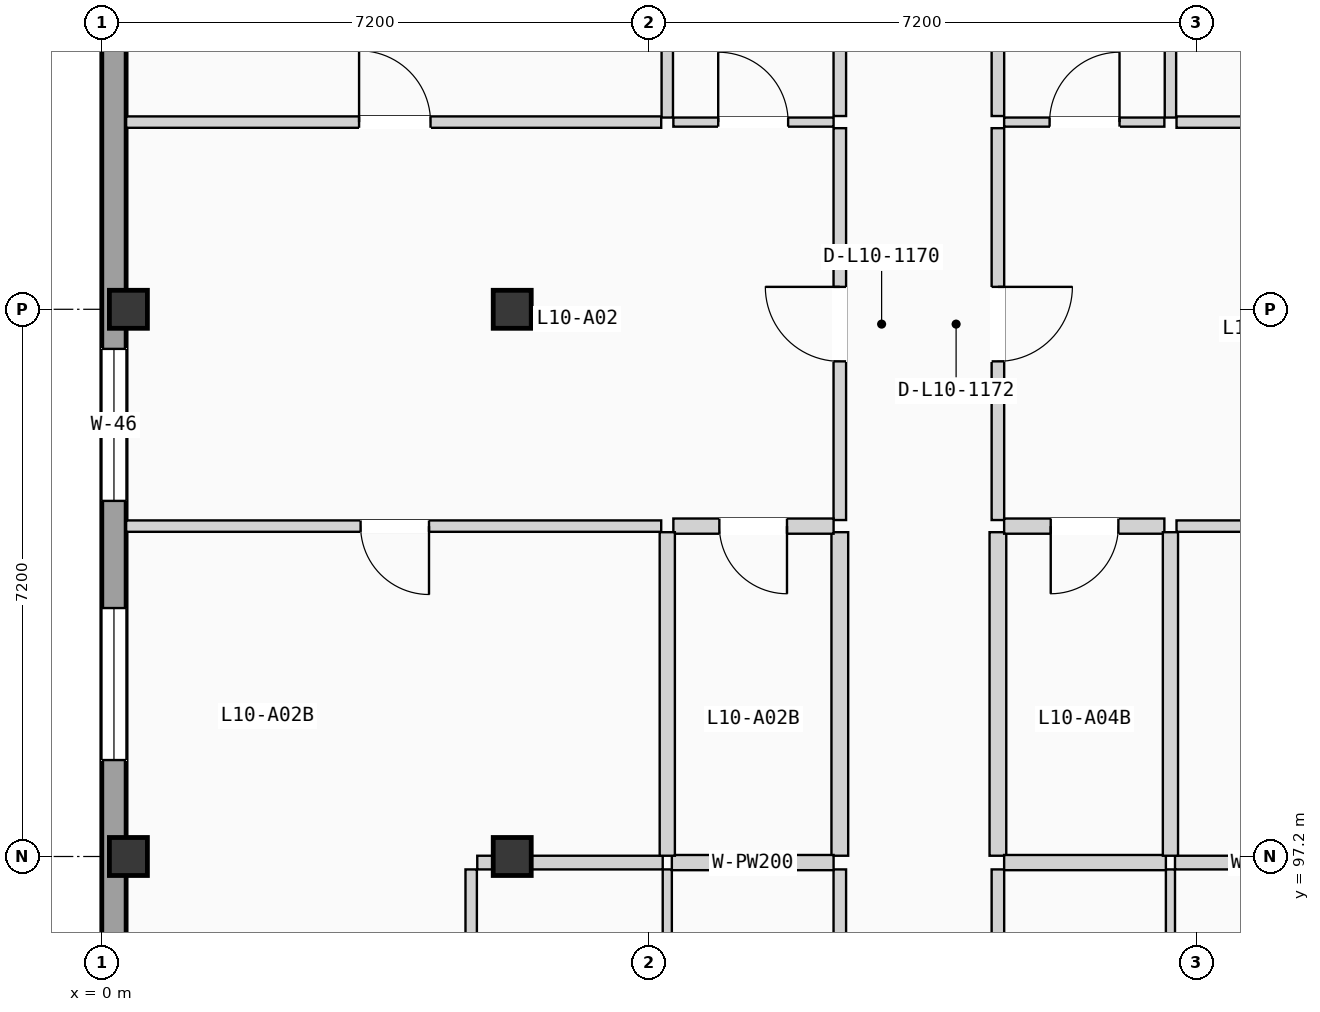
"""IFC4 building model, lengths in metres.
Left out: names, types, materials, properties, quantities, classifications, styles, units other than length and angle.
Written with IfcOpenShell. Run it as: python <this file> out.ifc"""

import sys

from ifc_helpers import new_model, si_unit, direction, frame, frame_2d, origin, origin_2d, place, context, subcontext, project, spatial, rectangle, extrude, element, fill, save


model = new_model("IFC4")
c1 = context("Model", 3, precision=1e-05, world=origin(), true_north=direction((0.0, 1.0)))
c2 = subcontext(c1, "Body", "Model", "MODEL_VIEW")
j1 = project(units=[si_unit("LENGTHUNIT", "METRE"), si_unit("PLANEANGLEUNIT", "RADIAN")], contexts=[c1])
p1 = place(None, origin())
s1 = spatial("IfcSite", under=j1, at=p1, CompositionType="ELEMENT")
p2 = place(p1, origin())
s2 = spatial("IfcBuilding", under=s1, at=p2, CompositionType="ELEMENT")
p3 = place(p2, frame((0.0, 0.0, 34.125)))
s3 = spatial("IfcBuildingStorey", under=s2, at=p3, CompositionType="ELEMENT", Elevation=34.125)
for number, where, z_axis, x_axis in (
    (1, (0.35, 97.2, 0.0), (0.0, 0.0, 1.0), (1.0, 0.0, 0.0)),
    (2, (0.35, 104.4, 0.0), (0.0, 0.0, 1.0), (1.0, 0.0, 0.0)),
    (3, (5.4, 97.2, 0.0), (0.0, 0.0, 1.0), (1.0, 0.0, 0.0)),
    (4, (5.4, 104.4, 0.0), (0.0, 0.0, 1.0), (1.0, 0.0, 0.0)),
):
    element("IfcColumn", number, at=place(p3, frame(where, z_axis=z_axis, x_axis=x_axis)), inside=s3, PredefinedType="COLUMN", context=c2, shape_type="SweptSolid", body=[
        extrude(rectangle(XDim=0.5, YDim=0.5, at=origin_2d()), origin(), (0.0, 0.0, 1.0), 3.15),
    ])
p4 = place(p3, frame((0.16, 68.72, 0.0), z_axis=(0.0, 0.0, 1.0), x_axis=(0.0, 1.0, 0.0)))
e5 = element("IfcWall", 5, at=p4, inside=s3, PredefinedType="SOLIDWALL", context=c2, shape_type="SweptSolid", body=[
    extrude(rectangle(XDim=49.76, YDim=0.32, at=frame_2d((24.88, 0.0))), origin(), (0.0, 0.0, 1.0), 2.89),
])
p5 = place(p4, frame((16.755, 0.0, 0.705)))
e6 = element("IfcOpeningElement", 6, at=p5, cuts=e5, PredefinedType="OPENING", context=c2, shape_type="SweptSolid", body=[
    extrude(rectangle(XDim=1.85, YDim=1.5, at=frame_2d((0.925, 0.75))), frame((0.0, 0.17, 0.0), z_axis=(0.0, -1.0, 0.0), x_axis=(1.0, 0.0, 0.0)), (0.0, 0.0, 1.0), 0.34),
])
p6 = place(p4, frame((9.62, 0.0, 0.555)))
e7 = element("IfcOpeningElement", 7, at=p6, cuts=e5, PredefinedType="OPENING", context=c2, shape_type="SweptSolid", body=[
    extrude(rectangle(XDim=1.85, YDim=1.65, at=frame_2d((0.925, 0.825))), frame((0.0, 0.17, 0.0), z_axis=(0.0, -1.0, 0.0), x_axis=(1.0, 0.0, 0.0)), (0.0, 0.0, 1.0), 0.34),
])
p7 = place(p4, frame((24.405, 0.0, 0.85)))
e8 = element("IfcOpeningElement", 8, at=p7, cuts=e5, PredefinedType="OPENING", context=c2, shape_type="SweptSolid", body=[
    extrude(rectangle(XDim=0.95, YDim=1.2, at=frame_2d((0.475, 0.6))), frame((0.0, 0.17, 0.0), z_axis=(0.0, -1.0, 0.0), x_axis=(1.0, 0.0, 0.0)), (0.0, 0.0, 1.0), 0.34),
])
p8 = place(p4, frame((33.159, 0.0, 0.9)))
e9 = element("IfcOpeningElement", 9, at=p8, cuts=e5, PredefinedType="OPENING", context=c2, shape_type="SweptSolid", body=[
    extrude(rectangle(XDim=2.0, YDim=1.2, at=frame_2d((1.0, 0.6))), frame((0.0, 0.17, 0.0), z_axis=(0.0, -1.0, 0.0), x_axis=(1.0, 0.0, 0.0)), (0.0, 0.0, 1.0), 0.34),
])
p9 = place(p4, frame((29.749, 0.0, 0.855)))
e10 = element("IfcOpeningElement", 10, at=p9, cuts=e5, PredefinedType="OPENING", context=c2, shape_type="SweptSolid", body=[
    extrude(rectangle(XDim=2.0, YDim=1.35, at=frame_2d((1.0, 0.675))), frame((0.0, 0.17, 0.0), z_axis=(0.0, -1.0, 0.0), x_axis=(1.0, 0.0, 0.0)), (0.0, 0.0, 1.0), 0.34),
])
p10 = place(p4, frame((39.352, 0.0, 0.705)))
e11 = element("IfcOpeningElement", 11, at=p10, cuts=e5, PredefinedType="OPENING", context=c2, shape_type="SweptSolid", body=[
    extrude(rectangle(XDim=2.0, YDim=1.5, at=frame_2d((1.0, 0.75))), frame((0.0, 0.17, 0.0), z_axis=(0.0, -1.0, 0.0), x_axis=(1.0, 0.0, 0.0)), (0.0, 0.0, 1.0), 0.34),
])
p11 = place(p3, frame((9.71, 89.13, 0.0), z_axis=(0.0, 0.0, 1.0), x_axis=(0.0, 1.0, 0.0)))
e12 = element("IfcWall", 12, at=p11, inside=s3, PredefinedType="PARTITIONING", context=c2, shape_type="SweptSolid", body=[
    extrude(rectangle(XDim=7.9, YDim=0.165, at=frame_2d((3.95, 0.0))), origin(), (0.0, 0.0, 1.0), 2.87),
])
p12 = place(p3, frame((9.71, 101.627, 0.0), z_axis=(0.0, 0.0, 1.0), x_axis=(0.0, 1.0, 0.0)))
e13 = element("IfcWall", 13, at=p12, inside=s3, PredefinedType="PARTITIONING", context=c2, shape_type="SweptSolid", body=[
    extrude(rectangle(XDim=5.156, YDim=0.165, at=frame_2d((2.578, 0.0))), origin(), (0.0, 0.0, 1.0), 2.87),
])
p13 = place(p12, frame((2.088, 0.0, 0.0)))
e14 = element("IfcOpeningElement", 14, at=p13, cuts=e13, PredefinedType="OPENING", context=c2, shape_type="SweptSolid", body=[
    extrude(rectangle(XDim=0.98, YDim=2.08, at=frame_2d((0.49, 1.04))), frame((0.0, 0.093, 0.0), z_axis=(0.0, -1.0, 0.0), x_axis=(1.0, 0.0, 0.0)), (0.0, 0.0, 1.0), 0.185),
])
p14 = place(p3, frame((9.71, 97.21, 0.0), z_axis=(0.0, 0.0, 1.0), x_axis=(0.0, 1.0, 0.0)))
e15 = element("IfcWall", 15, at=p14, inside=s3, PredefinedType="PLUMBINGWALL", context=c2, shape_type="SweptSolid", body=[
    extrude(rectangle(XDim=4.257, YDim=0.22, at=frame_2d((2.128, 0.0))), origin(), (0.0, 0.0, 1.0), 2.87),
])
p15 = place(p3, frame((9.71, 106.943, 0.0), z_axis=(0.0, 0.0, 1.0), x_axis=(0.0, 1.0, 0.0)))
e16 = element("IfcWall", 16, at=p15, inside=s3, PredefinedType="PARTITIONING", context=c2, shape_type="SweptSolid", body=[
    extrude(rectangle(XDim=4.257, YDim=0.165, at=frame_2d((2.128, 0.0))), origin(), (0.0, 0.0, 1.0), 2.87),
])
p16 = place(p3, frame((11.79, 89.13, 0.0), z_axis=(0.0, 0.0, 1.0), x_axis=(0.0, 1.0, 0.0)))
e17 = element("IfcWall", 17, at=p16, inside=s3, PredefinedType="PARTITIONING", context=c2, shape_type="SweptSolid", body=[
    extrude(rectangle(XDim=7.9, YDim=0.165, at=frame_2d((3.95, 0.0))), origin(), (0.0, 0.0, 1.0), 2.87),
])
p17 = place(p3, frame((11.79, 101.627, 0.0), z_axis=(0.0, 0.0, 1.0), x_axis=(0.0, 1.0, 0.0)))
e18 = element("IfcWall", 18, at=p17, inside=s3, PredefinedType="PARTITIONING", context=c2, shape_type="SweptSolid", body=[
    extrude(rectangle(XDim=5.156, YDim=0.165, at=frame_2d((2.578, 0.0))), origin(), (0.0, 0.0, 1.0), 2.87),
])
p18 = place(p17, frame((2.088, 0.0, 0.0)))
e19 = element("IfcOpeningElement", 19, at=p18, cuts=e18, PredefinedType="OPENING", context=c2, shape_type="SweptSolid", body=[
    extrude(rectangle(XDim=0.98, YDim=2.08, at=frame_2d((0.49, 1.04))), frame((0.0, 0.093, 0.0), z_axis=(0.0, -1.0, 0.0), x_axis=(1.0, 0.0, 0.0)), (0.0, 0.0, 1.0), 0.185),
])
p19 = place(p3, frame((11.79, 97.21, 0.0), z_axis=(0.0, 0.0, 1.0), x_axis=(0.0, 1.0, 0.0)))
e20 = element("IfcWall", 20, at=p19, inside=s3, PredefinedType="PLUMBINGWALL", context=c2, shape_type="SweptSolid", body=[
    extrude(rectangle(XDim=4.257, YDim=0.22, at=frame_2d((2.128, 0.0))), origin(), (0.0, 0.0, 1.0), 2.87),
])
p20 = place(p3, frame((11.79, 106.943, 0.0), z_axis=(0.0, 0.0, 1.0), x_axis=(0.0, 1.0, 0.0)))
e21 = element("IfcWall", 21, at=p20, inside=s3, PredefinedType="PARTITIONING", context=c2, shape_type="SweptSolid", body=[
    extrude(rectangle(XDim=4.257, YDim=0.165, at=frame_2d((2.128, 0.0))), origin(), (0.0, 0.0, 1.0), 2.87),
])
p21 = place(p3, frame((7.44, 89.11, 0.0), z_axis=(0.0, 0.0, 1.0), x_axis=(0.0, 1.0, 0.0)))
e22 = element("IfcWall", 22, at=p21, inside=s3, PredefinedType="PARTITIONING", context=c2, shape_type="SweptSolid", body=[
    extrude(rectangle(XDim=7.92, YDim=0.12, at=frame_2d((3.96, 0.0))), origin(), (0.0, 0.0, 1.0), 2.87),
])
p22 = place(p3, frame((7.5, 97.12, 0.0), z_axis=(0.0, 0.0, 1.0), x_axis=(1.0, 0.0, 0.0)))
e23 = element("IfcWall", 23, at=p22, inside=s3, PredefinedType="PLUMBINGWALL", context=c2, shape_type="SweptSolid", body=[
    extrude(rectangle(XDim=2.128, YDim=0.2, at=frame_2d((1.064, 0.0))), origin(), (0.0, 0.0, 1.0), 2.16),
])
p23 = place(p3, frame((4.86, 89.11, 0.0), z_axis=(0.0, 0.0, 1.0), x_axis=(0.0, 1.0, 0.0)))
e24 = element("IfcWall", 24, at=p23, inside=s3, PredefinedType="PARTITIONING", context=c2, shape_type="SweptSolid", body=[
    extrude(rectangle(XDim=7.92, YDim=0.15, at=frame_2d((3.96, 0.0))), origin(), (0.0, 0.0, 1.0), 2.87),
])
p24 = place(p3, frame((4.94, 97.12, 0.0), z_axis=(0.0, 0.0, 1.0), x_axis=(1.0, 0.0, 0.0)))
e25 = element("IfcWall", 25, at=p24, inside=s3, PredefinedType="PARTITIONING", context=c2, shape_type="SweptSolid", body=[
    extrude(rectangle(XDim=2.44, YDim=0.18, at=frame_2d((1.22, 0.0))), origin(), (0.0, 0.0, 1.0), 2.16),
])
p25 = place(p3, frame((7.52, 101.547, 0.0), z_axis=(0.0, 0.0, 1.0), x_axis=(1.0, 0.0, 0.0)))
e26 = element("IfcWall", 26, at=p25, inside=s3, PredefinedType="PLUMBINGWALL", context=c2, shape_type="SweptSolid", body=[
    extrude(rectangle(XDim=2.108, YDim=0.2, at=frame_2d((1.054, 0.0))), origin(), (0.0, 0.0, 1.0), 2.87),
])
p26 = place(p25, frame((0.605, 0.0, 0.0)))
e27 = element("IfcOpeningElement", 27, at=p26, cuts=e26, PredefinedType="OPENING", context=c2, shape_type="SweptSolid", body=[
    extrude(rectangle(XDim=0.89, YDim=2.03, at=frame_2d((0.445, 1.015))), frame((0.0, 0.11, 0.0), z_axis=(0.0, -1.0, 0.0), x_axis=(1.0, 0.0, 0.0)), (0.0, 0.0, 1.0), 0.22),
])
p27 = place(p3, frame((7.52, 106.863, 0.0), z_axis=(0.0, 0.0, 1.0), x_axis=(1.0, 0.0, 0.0)))
e28 = element("IfcWall", 28, at=p27, inside=s3, PredefinedType="PARTITIONING", context=c2, shape_type="SweptSolid", body=[
    extrude(rectangle(XDim=2.108, YDim=0.12, at=frame_2d((1.054, 0.0))), origin(), (0.0, 0.0, 1.0), 2.87),
])
p28 = place(p27, frame((0.59, 0.0, 0.0)))
e29 = element("IfcOpeningElement", 29, at=p28, cuts=e28, PredefinedType="OPENING", context=c2, shape_type="SweptSolid", body=[
    extrude(rectangle(XDim=0.92, YDim=2.02, at=frame_2d((0.46, 1.01))), frame((0.0, 0.07, 0.0), z_axis=(0.0, -1.0, 0.0), x_axis=(1.0, 0.0, 0.0)), (0.0, 0.0, 1.0), 0.14),
])
p29 = place(p3, frame((0.32, 101.547, 0.0), z_axis=(0.0, 0.0, 1.0), x_axis=(1.0, 0.0, 0.0)))
e30 = element("IfcWall", 30, at=p29, inside=s3, PredefinedType="PARTITIONING", context=c2, shape_type="SweptSolid", body=[
    extrude(rectangle(XDim=7.04, YDim=0.15, at=frame_2d((3.52, 0.0))), origin(), (0.0, 0.0, 1.0), 2.87),
])
p30 = place(p29, frame((3.085, 0.0, 0.0)))
e31 = element("IfcOpeningElement", 31, at=p30, cuts=e30, PredefinedType="OPENING", context=c2, shape_type="SweptSolid", body=[
    extrude(rectangle(XDim=0.9, YDim=2.04, at=frame_2d((0.45, 1.02))), frame((0.0, 0.085, 0.0), z_axis=(0.0, -1.0, 0.0), x_axis=(1.0, 0.0, 0.0)), (0.0, 0.0, 1.0), 0.17),
])
p31 = place(p3, frame((0.32, 106.863, 0.0), z_axis=(0.0, 0.0, 1.0), x_axis=(1.0, 0.0, 0.0)))
e32 = element("IfcWall", 32, at=p31, inside=s3, PredefinedType="PARTITIONING", context=c2, shape_type="SweptSolid", body=[
    extrude(rectangle(XDim=7.04, YDim=0.15, at=frame_2d((3.52, 0.0))), origin(), (0.0, 0.0, 1.0), 2.87),
])
p32 = place(p31, frame((3.065, 0.0, 0.0)))
e33 = element("IfcOpeningElement", 33, at=p32, cuts=e32, PredefinedType="OPENING", context=c2, shape_type="SweptSolid", body=[
    extrude(rectangle(XDim=0.94, YDim=2.06, at=frame_2d((0.47, 1.03))), frame((0.0, 0.085, 0.0), z_axis=(0.0, -1.0, 0.0), x_axis=(1.0, 0.0, 0.0)), (0.0, 0.0, 1.0), 0.17),
])
p33 = place(p3, frame((7.44, 97.21, 0.0), z_axis=(0.0, 0.0, 1.0), x_axis=(0.0, 1.0, 0.0)))
e34 = element("IfcWall", 34, at=p33, inside=s3, PredefinedType="PLUMBINGWALL", context=c2, shape_type="SweptSolid", body=[
    extrude(rectangle(XDim=4.257, YDim=0.2, at=frame_2d((2.128, 0.0))), origin(), (0.0, 0.0, 1.0), 2.87),
])
p34 = place(p3, frame((7.44, 106.923, 0.0), z_axis=(0.0, 0.0, 1.0), x_axis=(0.0, 1.0, 0.0)))
e35 = element("IfcWall", 35, at=p34, inside=s3, PredefinedType="PARTITIONING", context=c2, shape_type="SweptSolid", body=[
    extrude(rectangle(XDim=4.277, YDim=0.15, at=frame_2d((2.138, 0.0))), origin(), (0.0, 0.0, 1.0), 2.87),
])
p35 = place(p3, frame((14.06, 89.11, 0.0), z_axis=(0.0, 0.0, 1.0), x_axis=(0.0, 1.0, 0.0)))
e36 = element("IfcWall", 36, at=p35, inside=s3, PredefinedType="PARTITIONING", context=c2, shape_type="SweptSolid", body=[
    extrude(rectangle(XDim=7.92, YDim=0.12, at=frame_2d((3.96, 0.0))), origin(), (0.0, 0.0, 1.0), 2.87),
])
p36 = place(p3, frame((11.872, 97.12, 0.0), z_axis=(0.0, 0.0, 1.0), x_axis=(1.0, 0.0, 0.0)))
e37 = element("IfcWall", 37, at=p36, inside=s3, PredefinedType="PLUMBINGWALL", context=c2, shape_type="SweptSolid", body=[
    extrude(rectangle(XDim=2.128, YDim=0.2, at=frame_2d((1.064, 0.0))), origin(), (0.0, 0.0, 1.0), 2.16),
])
p37 = place(p3, frame((14.12, 97.12, 0.0), z_axis=(0.0, 0.0, 1.0), x_axis=(1.0, 0.0, 0.0)))
e38 = element("IfcWall", 38, at=p37, inside=s3, PredefinedType="PARTITIONING", context=c2, shape_type="SweptSolid", body=[
    extrude(rectangle(XDim=2.54, YDim=0.18, at=frame_2d((1.27, 0.0))), origin(), (0.0, 0.0, 1.0), 2.16),
])
p38 = place(p3, frame((11.872, 101.547, 0.0), z_axis=(0.0, 0.0, 1.0), x_axis=(1.0, 0.0, 0.0)))
e39 = element("IfcWall", 39, at=p38, inside=s3, PredefinedType="PLUMBINGWALL", context=c2, shape_type="SweptSolid", body=[
    extrude(rectangle(XDim=2.108, YDim=0.2, at=frame_2d((1.054, 0.0))), origin(), (0.0, 0.0, 1.0), 2.87),
])
p39 = place(p38, frame((0.613, 0.0, 0.0)))
e40 = element("IfcOpeningElement", 40, at=p39, cuts=e39, PredefinedType="OPENING", context=c2, shape_type="SweptSolid", body=[
    extrude(rectangle(XDim=0.89, YDim=2.03, at=frame_2d((0.445, 1.015))), frame((0.0, 0.11, 0.0), z_axis=(0.0, -1.0, 0.0), x_axis=(1.0, 0.0, 0.0)), (0.0, 0.0, 1.0), 0.22),
])
p40 = place(p3, frame((11.872, 106.863, 0.0), z_axis=(0.0, 0.0, 1.0), x_axis=(1.0, 0.0, 0.0)))
e41 = element("IfcWall", 41, at=p40, inside=s3, PredefinedType="PARTITIONING", context=c2, shape_type="SweptSolid", body=[
    extrude(rectangle(XDim=2.108, YDim=0.12, at=frame_2d((1.054, 0.0))), origin(), (0.0, 0.0, 1.0), 2.87),
])
p41 = place(p40, frame((0.598, 0.0, 0.0)))
e42 = element("IfcOpeningElement", 42, at=p41, cuts=e41, PredefinedType="OPENING", context=c2, shape_type="SweptSolid", body=[
    extrude(rectangle(XDim=0.92, YDim=2.02, at=frame_2d((0.46, 1.01))), frame((0.0, 0.07, 0.0), z_axis=(0.0, -1.0, 0.0), x_axis=(1.0, 0.0, 0.0)), (0.0, 0.0, 1.0), 0.14),
])
p42 = place(p3, frame((14.14, 101.547, 0.0), z_axis=(0.0, 0.0, 1.0), x_axis=(1.0, 0.0, 0.0)))
e43 = element("IfcWall", 43, at=p42, inside=s3, PredefinedType="PARTITIONING", context=c2, shape_type="SweptSolid", body=[
    extrude(rectangle(XDim=7.14, YDim=0.15, at=frame_2d((3.57, 0.0))), origin(), (0.0, 0.0, 1.0), 2.87),
])
p43 = place(p42, frame((3.015, 0.0, 0.0)))
e44 = element("IfcOpeningElement", 44, at=p43, cuts=e43, PredefinedType="OPENING", context=c2, shape_type="SweptSolid", body=[
    extrude(rectangle(XDim=1.08, YDim=2.1, at=frame_2d((0.54, 1.05))), frame((0.0, 0.085, 0.0), z_axis=(0.0, -1.0, 0.0), x_axis=(1.0, 0.0, 0.0)), (0.0, 0.0, 1.0), 0.17),
])
p44 = place(p3, frame((14.14, 106.863, 0.0), z_axis=(0.0, 0.0, 1.0), x_axis=(1.0, 0.0, 0.0)))
e45 = element("IfcWall", 45, at=p44, inside=s3, PredefinedType="PARTITIONING", context=c2, shape_type="SweptSolid", body=[
    extrude(rectangle(XDim=7.14, YDim=0.15, at=frame_2d((3.57, 0.0))), origin(), (0.0, 0.0, 1.0), 2.87),
])
p45 = place(p44, frame((3.105, 0.0, 0.0)))
e46 = element("IfcOpeningElement", 46, at=p45, cuts=e45, PredefinedType="OPENING", context=c2, shape_type="SweptSolid", body=[
    extrude(rectangle(XDim=0.9, YDim=2.04, at=frame_2d((0.45, 1.02))), frame((0.0, 0.085, 0.0), z_axis=(0.0, -1.0, 0.0), x_axis=(1.0, 0.0, 0.0)), (0.0, 0.0, 1.0), 0.17),
])
p46 = place(p3, frame((14.06, 97.21, 0.0), z_axis=(0.0, 0.0, 1.0), x_axis=(0.0, 1.0, 0.0)))
e47 = element("IfcWall", 47, at=p46, inside=s3, PredefinedType="PLUMBINGWALL", context=c2, shape_type="SweptSolid", body=[
    extrude(rectangle(XDim=4.257, YDim=0.2, at=frame_2d((2.128, 0.0))), origin(), (0.0, 0.0, 1.0), 2.87),
])
p47 = place(p3, frame((14.06, 106.923, 0.0), z_axis=(0.0, 0.0, 1.0), x_axis=(0.0, 1.0, 0.0)))
e48 = element("IfcWall", 48, at=p47, inside=s3, PredefinedType="PARTITIONING", context=c2, shape_type="SweptSolid", body=[
    extrude(rectangle(XDim=4.277, YDim=0.15, at=frame_2d((2.138, 0.0))), origin(), (0.0, 0.0, 1.0), 2.87),
])
p48 = place(p8, origin())
e49 = element("IfcWindow", 49, at=p48, inside=s3, PartitioningType="DOUBLE_PANEL_VERTICAL", PredefinedType="WINDOW", context=c2, shape_type="SweptSolid", body=[
    extrude(rectangle(XDim=2.0, YDim=1.2, at=frame_2d((1.0, 0.6))), frame((0.0, 0.03, 0.0), z_axis=(0.0, -1.0, 0.0), x_axis=(1.0, 0.0, 0.0)), (0.0, 0.0, 1.0), 0.06),
])
fill(e9, e49)
p49 = place(p9, origin())
e50 = element("IfcWindow", 50, at=p49, inside=s3, PartitioningType="DOUBLE_PANEL_VERTICAL", PredefinedType="WINDOW", context=c2, shape_type="SweptSolid", body=[
    extrude(rectangle(XDim=2.0, YDim=1.35, at=frame_2d((1.0, 0.675))), frame((0.0, 0.03, 0.0), z_axis=(0.0, -1.0, 0.0), x_axis=(1.0, 0.0, 0.0)), (0.0, 0.0, 1.0), 0.06),
])
fill(e10, e50)
p50 = place(p13, origin())
e51 = element("IfcDoor", 51, at=p50, inside=s3, OperationType="SINGLE_SWING_RIGHT", PredefinedType="DOOR", context=c2, shape_type="SweptSolid", body=[
    extrude(rectangle(XDim=0.98, YDim=2.08, at=frame_2d((0.49, 1.04))), frame((0.0, 0.025, 0.0), z_axis=(0.0, -1.0, 0.0), x_axis=(1.0, 0.0, 0.0)), (0.0, 0.0, 1.0), 0.05),
])
fill(e14, e51)
p51 = place(p18, frame((0.98, 0.0, 0.0), z_axis=(0.0, 0.0, 1.0), x_axis=(-1.0, 0.0, 0.0)))
e52 = element("IfcDoor", 52, at=p51, inside=s3, OperationType="SINGLE_SWING_RIGHT", PredefinedType="DOOR", context=c2, shape_type="SweptSolid", body=[
    extrude(rectangle(XDim=0.98, YDim=2.08, at=frame_2d((0.49, 1.04))), frame((0.0, 0.025, 0.0), z_axis=(0.0, -1.0, 0.0), x_axis=(1.0, 0.0, 0.0)), (0.0, 0.0, 1.0), 0.05),
])
fill(e19, e52)
p52 = place(p26, frame((0.89, 0.0, 0.0), z_axis=(0.0, 0.0, 1.0), x_axis=(-1.0, 0.0, 0.0)))
e53 = element("IfcDoor", 53, at=p52, inside=s3, OperationType="SINGLE_SWING_RIGHT", PredefinedType="DOOR", context=c2, shape_type="SweptSolid", body=[
    extrude(rectangle(XDim=0.89, YDim=2.03, at=frame_2d((0.445, 1.015))), frame((0.0, 0.025, 0.0), z_axis=(0.0, -1.0, 0.0), x_axis=(1.0, 0.0, 0.0)), (0.0, 0.0, 1.0), 0.05),
])
fill(e27, e53)
p53 = place(p28, origin())
e54 = element("IfcDoor", 54, at=p53, inside=s3, OperationType="SINGLE_SWING_LEFT", PredefinedType="DOOR", context=c2, shape_type="SweptSolid", body=[
    extrude(rectangle(XDim=0.92, YDim=2.02, at=frame_2d((0.46, 1.01))), frame((0.0, 0.025, 0.0), z_axis=(0.0, -1.0, 0.0), x_axis=(1.0, 0.0, 0.0)), (0.0, 0.0, 1.0), 0.05),
])
fill(e29, e54)
p54 = place(p30, frame((0.9, 0.0, 0.0), z_axis=(0.0, 0.0, 1.0), x_axis=(-1.0, 0.0, 0.0)))
e55 = element("IfcDoor", 55, at=p54, inside=s3, OperationType="SINGLE_SWING_RIGHT", PredefinedType="DOOR", context=c2, shape_type="SweptSolid", body=[
    extrude(rectangle(XDim=0.9, YDim=2.04, at=frame_2d((0.45, 1.02))), frame((0.0, 0.025, 0.0), z_axis=(0.0, -1.0, 0.0), x_axis=(1.0, 0.0, 0.0)), (0.0, 0.0, 1.0), 0.05),
])
fill(e31, e55)
p55 = place(p32, origin())
e56 = element("IfcDoor", 56, at=p55, inside=s3, OperationType="SINGLE_SWING_LEFT", PredefinedType="DOOR", context=c2, shape_type="SweptSolid", body=[
    extrude(rectangle(XDim=0.94, YDim=2.06, at=frame_2d((0.47, 1.03))), frame((0.0, 0.025, 0.0), z_axis=(0.0, -1.0, 0.0), x_axis=(1.0, 0.0, 0.0)), (0.0, 0.0, 1.0), 0.05),
])
fill(e33, e56)
p56 = place(p39, frame((0.89, 0.0, 0.0), z_axis=(0.0, 0.0, 1.0), x_axis=(-1.0, 0.0, 0.0)))
e57 = element("IfcDoor", 57, at=p56, inside=s3, OperationType="SINGLE_SWING_LEFT", PredefinedType="DOOR", context=c2, shape_type="SweptSolid", body=[
    extrude(rectangle(XDim=0.89, YDim=2.03, at=frame_2d((0.445, 1.015))), frame((0.0, 0.025, 0.0), z_axis=(0.0, -1.0, 0.0), x_axis=(1.0, 0.0, 0.0)), (0.0, 0.0, 1.0), 0.05),
])
fill(e40, e57)
p57 = place(p41, origin())
e58 = element("IfcDoor", 58, at=p57, inside=s3, OperationType="SINGLE_SWING_RIGHT", PredefinedType="DOOR", context=c2, shape_type="SweptSolid", body=[
    extrude(rectangle(XDim=0.92, YDim=2.02, at=frame_2d((0.46, 1.01))), frame((0.0, 0.025, 0.0), z_axis=(0.0, -1.0, 0.0), x_axis=(1.0, 0.0, 0.0)), (0.0, 0.0, 1.0), 0.05),
])
fill(e42, e58)
save(model, sys.argv[1])
